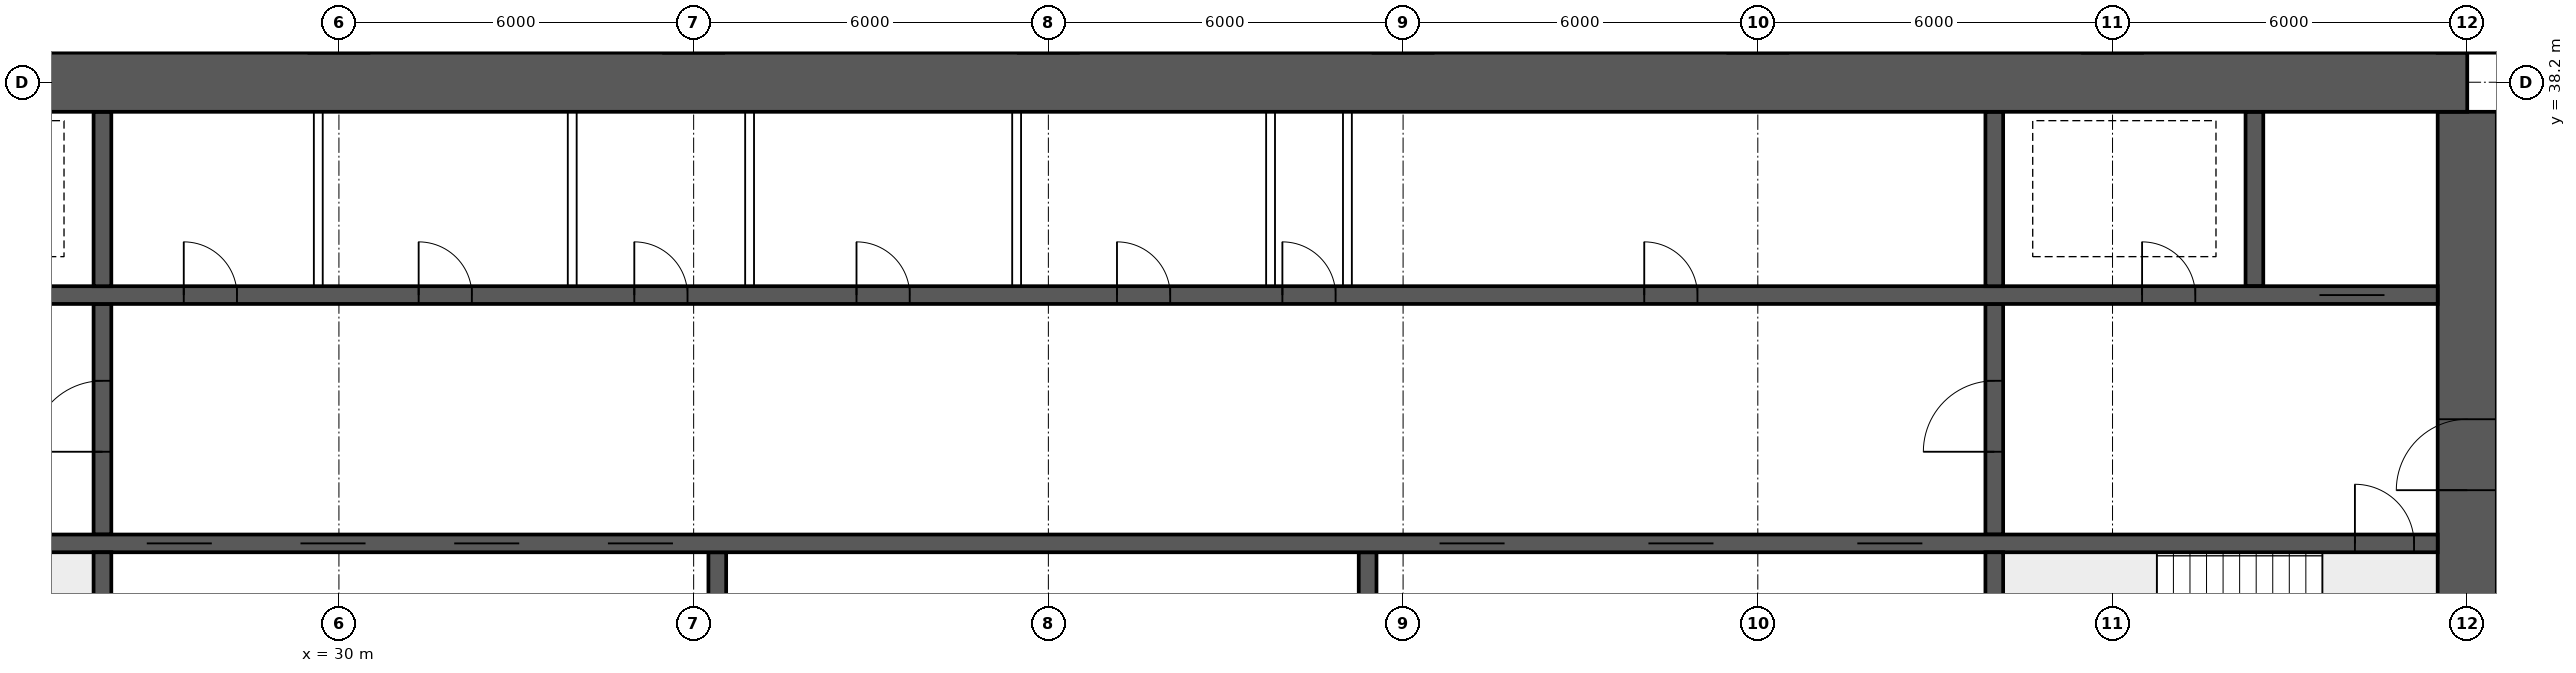
"""IFC4 building model, lengths in metres.
Left out: names, types, materials, properties, quantities, classifications, styles, units other than length and angle.
Written with IfcOpenShell. Run it as: python <this file> out.ifc"""

import sys

from ifc_helpers import new_model, si_unit, direction, frame, frame_2d, origin, place, context, subcontext, project, spatial, rectangle, extrude, element, fill, save


model = new_model("IFC4")
c1 = context("Model", 3, precision=1e-05, world=origin(), true_north=direction((0.0, 1.0)))
c2 = subcontext(c1, "Body", "Model", "MODEL_VIEW")
j1 = project(units=[si_unit("LENGTHUNIT", "METRE"), si_unit("PLANEANGLEUNIT", "RADIAN")], contexts=[c1])
p1 = place(None, origin())
s1 = spatial("IfcSite", under=j1, at=p1, CompositionType="ELEMENT")
p2 = place(p1, origin())
s2 = spatial("IfcBuilding", under=s1, at=p2, CompositionType="ELEMENT")
p3 = place(p2, frame((0.0, 0.0, 38.95)))
s3 = spatial("IfcBuildingStorey", under=s2, at=p3, CompositionType="ELEMENT", Elevation=38.95)
p4 = place(p3, frame((18.0, 38.2, 0.0), z_axis=(0.0, 0.0, 1.0), x_axis=(1.0, 0.0, 0.0)))
e1 = element("IfcWall", 1, at=p4, inside=s3, PredefinedType="SHEAR", context=c2, shape_type="SweptSolid", body=[
    extrude(rectangle(XDim=48.0, YDim=1.0, at=frame_2d((24.0, 0.0))), origin(), (0.0, 0.0, 1.0), 3.75),
])
p5 = place(p3, frame((66.0, 26.3, 0.0), z_axis=(0.0, 0.0, 1.0), x_axis=(0.0, 1.0, 0.0)))
e2 = element("IfcWall", 2, at=p5, inside=s3, PredefinedType="SHEAR", context=c2, shape_type="SweptSolid", body=[
    extrude(rectangle(XDim=11.4, YDim=1.0, at=frame_2d((5.7, 0.0))), origin(), (0.0, 0.0, 1.0), 3.75),
])
p6 = place(p5, frame((5.0, 0.0, 0.0)))
e3 = element("IfcOpeningElement", 3, at=p6, cuts=e2, PredefinedType="OPENING", context=c2, shape_type="SweptSolid", body=[
    extrude(rectangle(XDim=1.2, YDim=2.1, at=frame_2d((0.6, 1.05))), frame((0.0, 0.51, 0.0), z_axis=(0.0, -1.0, 0.0), x_axis=(1.0, 0.0, 0.0)), (0.0, 0.0, 1.0), 1.02),
])
p7 = place(p3, frame((18.5, 30.4, 0.0), z_axis=(0.0, 0.0, 1.0), x_axis=(1.0, 0.0, 0.0)))
e4 = element("IfcWall", 4, at=p7, inside=s3, PredefinedType="SHEAR", context=c2, shape_type="SweptSolid", body=[
    extrude(rectangle(XDim=47.0, YDim=0.3, at=frame_2d((23.5, 0.0))), origin(), (0.0, 0.0, 1.0), 3.75),
])
p8 = place(p7, frame((0.4, 0.0, 0.0)))
e5 = element("IfcOpeningElement", 5, at=p8, cuts=e4, PredefinedType="OPENING", context=c2, shape_type="SweptSolid", body=[
    extrude(rectangle(XDim=1.0, YDim=2.1, at=frame_2d((0.5, 1.05))), frame((0.0, 0.16, 0.0), z_axis=(0.0, -1.0, 0.0), x_axis=(1.0, 0.0, 0.0)), (0.0, 0.0, 1.0), 0.32),
])
p9 = place(p7, frame((45.6, 0.0, 0.0)))
e6 = element("IfcOpeningElement", 6, at=p9, cuts=e4, PredefinedType="OPENING", context=c2, shape_type="SweptSolid", body=[
    extrude(rectangle(XDim=1.0, YDim=2.1, at=frame_2d((0.5, 1.05))), frame((0.0, 0.16, 0.0), z_axis=(0.0, -1.0, 0.0), x_axis=(1.0, 0.0, 0.0)), (0.0, 0.0, 1.0), 0.32),
])
p10 = place(p7, frame((8.25, 0.0, 0.0)))
e7 = element("IfcOpeningElement", 7, at=p10, cuts=e4, PredefinedType="OPENING", context=c2, shape_type="SweptSolid", body=[
    extrude(rectangle(XDim=1.1, YDim=2.1, at=frame_2d((0.55, 1.05))), frame((0.0, 0.16, 0.0), z_axis=(0.0, -1.0, 0.0), x_axis=(1.0, 0.0, 0.0)), (0.0, 0.0, 1.0), 0.32),
])
p11 = place(p7, frame((10.85, 0.0, 0.0)))
e8 = element("IfcOpeningElement", 8, at=p11, cuts=e4, PredefinedType="OPENING", context=c2, shape_type="SweptSolid", body=[
    extrude(rectangle(XDim=1.1, YDim=2.1, at=frame_2d((0.55, 1.05))), frame((0.0, 0.16, 0.0), z_axis=(0.0, -1.0, 0.0), x_axis=(1.0, 0.0, 0.0)), (0.0, 0.0, 1.0), 0.32),
])
p12 = place(p7, frame((13.45, 0.0, 0.0)))
e9 = element("IfcOpeningElement", 9, at=p12, cuts=e4, PredefinedType="OPENING", context=c2, shape_type="SweptSolid", body=[
    extrude(rectangle(XDim=1.1, YDim=2.1, at=frame_2d((0.55, 1.05))), frame((0.0, 0.16, 0.0), z_axis=(0.0, -1.0, 0.0), x_axis=(1.0, 0.0, 0.0)), (0.0, 0.0, 1.0), 0.32),
])
p13 = place(p7, frame((16.05, 0.0, 0.0)))
e10 = element("IfcOpeningElement", 10, at=p13, cuts=e4, PredefinedType="OPENING", context=c2, shape_type="SweptSolid", body=[
    extrude(rectangle(XDim=1.1, YDim=2.1, at=frame_2d((0.55, 1.05))), frame((0.0, 0.16, 0.0), z_axis=(0.0, -1.0, 0.0), x_axis=(1.0, 0.0, 0.0)), (0.0, 0.0, 1.0), 0.32),
])
p14 = place(p7, frame((30.117, 0.0, 0.0)))
e11 = element("IfcOpeningElement", 11, at=p14, cuts=e4, PredefinedType="OPENING", context=c2, shape_type="SweptSolid", body=[
    extrude(rectangle(XDim=1.1, YDim=2.1, at=frame_2d((0.55, 1.05))), frame((0.0, 0.16, 0.0), z_axis=(0.0, -1.0, 0.0), x_axis=(1.0, 0.0, 0.0)), (0.0, 0.0, 1.0), 0.32),
])
p15 = place(p7, frame((33.65, 0.0, 0.0)))
e12 = element("IfcOpeningElement", 12, at=p15, cuts=e4, PredefinedType="OPENING", context=c2, shape_type="SweptSolid", body=[
    extrude(rectangle(XDim=1.1, YDim=2.1, at=frame_2d((0.55, 1.05))), frame((0.0, 0.16, 0.0), z_axis=(0.0, -1.0, 0.0), x_axis=(1.0, 0.0, 0.0)), (0.0, 0.0, 1.0), 0.32),
])
p16 = place(p7, frame((37.183, 0.0, 0.0)))
e13 = element("IfcOpeningElement", 13, at=p16, cuts=e4, PredefinedType="OPENING", context=c2, shape_type="SweptSolid", body=[
    extrude(rectangle(XDim=1.1, YDim=2.1, at=frame_2d((0.55, 1.05))), frame((0.0, 0.16, 0.0), z_axis=(0.0, -1.0, 0.0), x_axis=(1.0, 0.0, 0.0)), (0.0, 0.0, 1.0), 0.32),
])
p17 = place(p3, frame((18.5, 34.6, 0.0), z_axis=(0.0, 0.0, 1.0), x_axis=(1.0, 0.0, 0.0)))
e14 = element("IfcWall", 14, at=p17, inside=s3, PredefinedType="SHEAR", context=c2, shape_type="SweptSolid", body=[
    extrude(rectangle(XDim=47.0, YDim=0.3, at=frame_2d((23.5, 0.0))), origin(), (0.0, 0.0, 1.0), 3.75),
])
p18 = place(p17, frame((0.9, 0.0, 0.0)))
e15 = element("IfcOpeningElement", 15, at=p18, cuts=e14, PredefinedType="OPENING", context=c2, shape_type="SweptSolid", body=[
    extrude(rectangle(XDim=1.1, YDim=2.1, at=frame_2d((0.55, 1.05))), frame((0.0, 0.16, 0.0), z_axis=(0.0, -1.0, 0.0), x_axis=(1.0, 0.0, 0.0)), (0.0, 0.0, 1.0), 0.32),
])
p19 = place(p17, frame((45.0, 0.0, 0.0)))
e16 = element("IfcOpeningElement", 16, at=p19, cuts=e14, PredefinedType="OPENING", context=c2, shape_type="SweptSolid", body=[
    extrude(rectangle(XDim=1.1, YDim=2.1, at=frame_2d((0.55, 1.05))), frame((0.0, 0.16, 0.0), z_axis=(0.0, -1.0, 0.0), x_axis=(1.0, 0.0, 0.0)), (0.0, 0.0, 1.0), 0.32),
])
p20 = place(p17, frame((4.1, 0.0, 0.0)))
e17 = element("IfcOpeningElement", 17, at=p20, cuts=e14, PredefinedType="OPENING", context=c2, shape_type="SweptSolid", body=[
    extrude(rectangle(XDim=0.9, YDim=2.1, at=frame_2d((0.45, 1.05))), frame((0.0, 0.16, 0.0), z_axis=(0.0, -1.0, 0.0), x_axis=(1.0, 0.0, 0.0)), (0.0, 0.0, 1.0), 0.32),
])
p21 = place(p17, frame((42.0, 0.0, 0.0)))
e18 = element("IfcOpeningElement", 18, at=p21, cuts=e14, PredefinedType="OPENING", context=c2, shape_type="SweptSolid", body=[
    extrude(rectangle(XDim=0.9, YDim=2.1, at=frame_2d((0.45, 1.05))), frame((0.0, 0.16, 0.0), z_axis=(0.0, -1.0, 0.0), x_axis=(1.0, 0.0, 0.0)), (0.0, 0.0, 1.0), 0.32),
])
p22 = place(p17, frame((8.875, 0.0, 0.0)))
e19 = element("IfcOpeningElement", 19, at=p22, cuts=e14, PredefinedType="OPENING", context=c2, shape_type="SweptSolid", body=[
    extrude(rectangle(XDim=0.9, YDim=2.1, at=frame_2d((0.45, 1.05))), frame((0.0, 0.16, 0.0), z_axis=(0.0, -1.0, 0.0), x_axis=(1.0, 0.0, 0.0)), (0.0, 0.0, 1.0), 0.32),
])
p23 = place(p17, frame((12.849, 0.0, 0.0)))
e20 = element("IfcOpeningElement", 20, at=p23, cuts=e14, PredefinedType="OPENING", context=c2, shape_type="SweptSolid", body=[
    extrude(rectangle(XDim=0.9, YDim=2.1, at=frame_2d((0.45, 1.05))), frame((0.0, 0.16, 0.0), z_axis=(0.0, -1.0, 0.0), x_axis=(1.0, 0.0, 0.0)), (0.0, 0.0, 1.0), 0.32),
])
p24 = place(p17, frame((16.496, 0.0, 0.0)))
e21 = element("IfcOpeningElement", 21, at=p24, cuts=e14, PredefinedType="OPENING", context=c2, shape_type="SweptSolid", body=[
    extrude(rectangle(XDim=0.9, YDim=2.1, at=frame_2d((0.45, 1.05))), frame((0.0, 0.16, 0.0), z_axis=(0.0, -1.0, 0.0), x_axis=(1.0, 0.0, 0.0)), (0.0, 0.0, 1.0), 0.32),
])
p25 = place(p17, frame((20.255, 0.0, 0.0)))
e22 = element("IfcOpeningElement", 22, at=p25, cuts=e14, PredefinedType="OPENING", context=c2, shape_type="SweptSolid", body=[
    extrude(rectangle(XDim=0.9, YDim=2.1, at=frame_2d((0.45, 1.05))), frame((0.0, 0.16, 0.0), z_axis=(0.0, -1.0, 0.0), x_axis=(1.0, 0.0, 0.0)), (0.0, 0.0, 1.0), 0.32),
])
p26 = place(p17, frame((24.661, 0.0, 0.0)))
e23 = element("IfcOpeningElement", 23, at=p26, cuts=e14, PredefinedType="OPENING", context=c2, shape_type="SweptSolid", body=[
    extrude(rectangle(XDim=0.9, YDim=2.1, at=frame_2d((0.45, 1.05))), frame((0.0, 0.16, 0.0), z_axis=(0.0, -1.0, 0.0), x_axis=(1.0, 0.0, 0.0)), (0.0, 0.0, 1.0), 0.32),
])
p27 = place(p17, frame((27.458, 0.0, 0.0)))
e24 = element("IfcOpeningElement", 24, at=p27, cuts=e14, PredefinedType="OPENING", context=c2, shape_type="SweptSolid", body=[
    extrude(rectangle(XDim=0.9, YDim=2.1, at=frame_2d((0.45, 1.05))), frame((0.0, 0.16, 0.0), z_axis=(0.0, -1.0, 0.0), x_axis=(1.0, 0.0, 0.0)), (0.0, 0.0, 1.0), 0.32),
])
p28 = place(p17, frame((33.579, 0.0, 0.0)))
e25 = element("IfcOpeningElement", 25, at=p28, cuts=e14, PredefinedType="OPENING", context=c2, shape_type="SweptSolid", body=[
    extrude(rectangle(XDim=0.9, YDim=2.1, at=frame_2d((0.45, 1.05))), frame((0.0, 0.16, 0.0), z_axis=(0.0, -1.0, 0.0), x_axis=(1.0, 0.0, 0.0)), (0.0, 0.0, 1.0), 0.32),
])
for number, where, z_axis, x_axis in (
    (26, (26.0, 26.3, 0.0), (0.0, 0.0, 1.0), (0.0, 1.0, 0.0)),
    (27, (58.0, 26.3, 0.0), (0.0, 0.0, 1.0), (0.0, 1.0, 0.0)),
):
    element("IfcWall", number, at=place(p3, frame(where, z_axis=z_axis, x_axis=x_axis)), inside=s3, PredefinedType="SHEAR", context=c2, shape_type="SweptSolid", body=[
        extrude(rectangle(XDim=3.95, YDim=0.3, at=frame_2d((1.975, 0.0))), origin(), (0.0, 0.0, 1.0), 3.75),
    ])
p29 = place(p3, frame((26.0, 30.55, 0.0), z_axis=(0.0, 0.0, 1.0), x_axis=(0.0, 1.0, 0.0)))
e28 = element("IfcWall", 28, at=p29, inside=s3, PredefinedType="SHEAR", context=c2, shape_type="SweptSolid", body=[
    extrude(rectangle(XDim=3.9, YDim=0.3, at=frame_2d((1.95, 0.0))), origin(), (0.0, 0.0, 1.0), 3.75),
])
p30 = place(p29, frame((1.4, 0.0, 0.0)))
e29 = element("IfcOpeningElement", 29, at=p30, cuts=e28, PredefinedType="OPENING", context=c2, shape_type="SweptSolid", body=[
    extrude(rectangle(XDim=1.2, YDim=2.1, at=frame_2d((0.6, 1.05))), frame((0.0, 0.16, 0.0), z_axis=(0.0, -1.0, 0.0), x_axis=(1.0, 0.0, 0.0)), (0.0, 0.0, 1.0), 0.32),
])
p31 = place(p3, frame((58.0, 30.55, 0.0), z_axis=(0.0, 0.0, 1.0), x_axis=(0.0, 1.0, 0.0)))
e30 = element("IfcWall", 30, at=p31, inside=s3, PredefinedType="SHEAR", context=c2, shape_type="SweptSolid", body=[
    extrude(rectangle(XDim=3.9, YDim=0.3, at=frame_2d((1.95, 0.0))), origin(), (0.0, 0.0, 1.0), 3.75),
])
p32 = place(p31, frame((1.4, 0.0, 0.0)))
e31 = element("IfcOpeningElement", 31, at=p32, cuts=e30, PredefinedType="OPENING", context=c2, shape_type="SweptSolid", body=[
    extrude(rectangle(XDim=1.2, YDim=2.1, at=frame_2d((0.6, 1.05))), frame((0.0, 0.16, 0.0), z_axis=(0.0, -1.0, 0.0), x_axis=(1.0, 0.0, 0.0)), (0.0, 0.0, 1.0), 0.32),
])
for number, where, z_axis, x_axis in (
    (32, (62.4, 34.75, 0.0), (0.0, 0.0, 1.0), (0.0, 1.0, 0.0)),
    (33, (26.0, 34.75, 0.0), (0.0, 0.0, 1.0), (0.0, 1.0, 0.0)),
    (34, (58.0, 34.75, 0.0), (0.0, 0.0, 1.0), (0.0, 1.0, 0.0)),
):
    element("IfcWall", number, at=place(p3, frame(where, z_axis=z_axis, x_axis=x_axis)), inside=s3, PredefinedType="SHEAR", context=c2, shape_type="SweptSolid", body=[
        extrude(rectangle(XDim=2.95, YDim=0.3, at=frame_2d((1.475, 0.0))), origin(), (0.0, 0.0, 1.0), 3.75),
    ])
for number, where, z_axis, x_axis in (
    (35, (36.4, 26.3, 0.0), (0.0, 0.0, 1.0), (0.0, 1.0, 0.0)),
    (36, (47.4, 26.3, 0.0), (0.0, 0.0, 1.0), (0.0, 1.0, 0.0)),
):
    element("IfcWall", number, at=place(p3, frame(where, z_axis=z_axis, x_axis=x_axis)), inside=s3, PredefinedType="SHEAR", context=c2, shape_type="SweptSolid", body=[
        extrude(rectangle(XDim=3.95, YDim=0.3, at=frame_2d((1.975, 0.0))), origin(), (0.0, 0.0, 1.0), 3.75),
    ])
for number, where, z_axis, x_axis in (
    (37, (29.651, 34.75, 0.0), (0.0, 0.0, 1.0), (0.0, 1.0, 0.0)),
    (38, (33.946, 34.75, 0.0), (0.0, 0.0, 1.0), (0.0, 1.0, 0.0)),
    (39, (36.946, 34.75, 0.0), (0.0, 0.0, 1.0), (0.0, 1.0, 0.0)),
    (40, (41.463, 34.75, 0.0), (0.0, 0.0, 1.0), (0.0, 1.0, 0.0)),
    (41, (45.758, 34.75, 0.0), (0.0, 0.0, 1.0), (0.0, 1.0, 0.0)),
    (42, (47.058, 34.75, 0.0), (0.0, 0.0, 1.0), (0.0, 1.0, 0.0)),
):
    element("IfcWall", number, at=place(p3, frame(where, z_axis=z_axis, x_axis=x_axis)), inside=s3, PredefinedType="SOLIDWALL", context=c2, shape_type="SweptSolid", body=[
        extrude(rectangle(XDim=2.95, YDim=0.15, at=frame_2d((1.475, 0.0))), origin(), (0.0, 0.0, 1.0), 3.5),
    ])
p33 = place(p6, origin())
e43 = element("IfcDoor", 43, at=p33, inside=s3, OperationType="SINGLE_SWING_LEFT", PredefinedType="DOOR", context=c2, shape_type="SweptSolid", body=[
    extrude(rectangle(XDim=1.2, YDim=2.1, at=frame_2d((0.6, 1.05))), frame((0.0, 0.025, 0.0), z_axis=(0.0, -1.0, 0.0), x_axis=(1.0, 0.0, 0.0)), (0.0, 0.0, 1.0), 0.05),
])
fill(e3, e43)
p34 = place(p9, origin())
e44 = element("IfcDoor", 44, at=p34, inside=s3, OperationType="SINGLE_SWING_LEFT", PredefinedType="DOOR", context=c2, shape_type="SweptSolid", body=[
    extrude(rectangle(XDim=1.0, YDim=2.1, at=frame_2d((0.5, 1.05))), frame((0.0, 0.025, 0.0), z_axis=(0.0, -1.0, 0.0), x_axis=(1.0, 0.0, 0.0)), (0.0, 0.0, 1.0), 0.05),
])
fill(e6, e44)
p35 = place(p19, origin())
e45 = element("IfcDoor", 45, at=p35, inside=s3, OperationType="DOUBLE_DOOR_SLIDING", PredefinedType="DOOR", context=c2, shape_type="SweptSolid", body=[
    extrude(rectangle(XDim=1.1, YDim=2.1, at=frame_2d((0.55, 1.05))), frame((0.0, 0.025, 0.0), z_axis=(0.0, -1.0, 0.0), x_axis=(1.0, 0.0, 0.0)), (0.0, 0.0, 1.0), 0.05),
])
fill(e16, e45)
p36 = place(p21, origin())
e46 = element("IfcDoor", 46, at=p36, inside=s3, OperationType="SINGLE_SWING_LEFT", PredefinedType="DOOR", context=c2, shape_type="SweptSolid", body=[
    extrude(rectangle(XDim=0.9, YDim=2.1, at=frame_2d((0.45, 1.05))), frame((0.0, 0.025, 0.0), z_axis=(0.0, -1.0, 0.0), x_axis=(1.0, 0.0, 0.0)), (0.0, 0.0, 1.0), 0.05),
])
fill(e18, e46)
p37 = place(p30, origin())
e47 = element("IfcDoor", 47, at=p37, inside=s3, OperationType="SINGLE_SWING_LEFT", PredefinedType="DOOR", context=c2, shape_type="SweptSolid", body=[
    extrude(rectangle(XDim=1.2, YDim=2.1, at=frame_2d((0.6, 1.05))), frame((0.0, 0.025, 0.0), z_axis=(0.0, -1.0, 0.0), x_axis=(1.0, 0.0, 0.0)), (0.0, 0.0, 1.0), 0.05),
])
fill(e29, e47)
p38 = place(p32, origin())
e48 = element("IfcDoor", 48, at=p38, inside=s3, OperationType="SINGLE_SWING_LEFT", PredefinedType="DOOR", context=c2, shape_type="SweptSolid", body=[
    extrude(rectangle(XDim=1.2, YDim=2.1, at=frame_2d((0.6, 1.05))), frame((0.0, 0.025, 0.0), z_axis=(0.0, -1.0, 0.0), x_axis=(1.0, 0.0, 0.0)), (0.0, 0.0, 1.0), 0.05),
])
fill(e31, e48)
p39 = place(p22, origin())
e49 = element("IfcDoor", 49, at=p39, inside=s3, OperationType="SINGLE_SWING_LEFT", PredefinedType="DOOR", context=c2, shape_type="SweptSolid", body=[
    extrude(rectangle(XDim=0.9, YDim=2.1, at=frame_2d((0.45, 1.05))), frame((0.0, 0.025, 0.0), z_axis=(0.0, -1.0, 0.0), x_axis=(1.0, 0.0, 0.0)), (0.0, 0.0, 1.0), 0.05),
])
fill(e19, e49)
p40 = place(p23, origin())
e50 = element("IfcDoor", 50, at=p40, inside=s3, OperationType="SINGLE_SWING_LEFT", PredefinedType="DOOR", context=c2, shape_type="SweptSolid", body=[
    extrude(rectangle(XDim=0.9, YDim=2.1, at=frame_2d((0.45, 1.05))), frame((0.0, 0.025, 0.0), z_axis=(0.0, -1.0, 0.0), x_axis=(1.0, 0.0, 0.0)), (0.0, 0.0, 1.0), 0.05),
])
fill(e20, e50)
p41 = place(p24, origin())
e51 = element("IfcDoor", 51, at=p41, inside=s3, OperationType="SINGLE_SWING_LEFT", PredefinedType="DOOR", context=c2, shape_type="SweptSolid", body=[
    extrude(rectangle(XDim=0.9, YDim=2.1, at=frame_2d((0.45, 1.05))), frame((0.0, 0.025, 0.0), z_axis=(0.0, -1.0, 0.0), x_axis=(1.0, 0.0, 0.0)), (0.0, 0.0, 1.0), 0.05),
])
fill(e21, e51)
p42 = place(p25, origin())
e52 = element("IfcDoor", 52, at=p42, inside=s3, OperationType="SINGLE_SWING_LEFT", PredefinedType="DOOR", context=c2, shape_type="SweptSolid", body=[
    extrude(rectangle(XDim=0.9, YDim=2.1, at=frame_2d((0.45, 1.05))), frame((0.0, 0.025, 0.0), z_axis=(0.0, -1.0, 0.0), x_axis=(1.0, 0.0, 0.0)), (0.0, 0.0, 1.0), 0.05),
])
fill(e22, e52)
p43 = place(p26, origin())
e53 = element("IfcDoor", 53, at=p43, inside=s3, OperationType="SINGLE_SWING_LEFT", PredefinedType="DOOR", context=c2, shape_type="SweptSolid", body=[
    extrude(rectangle(XDim=0.9, YDim=2.1, at=frame_2d((0.45, 1.05))), frame((0.0, 0.025, 0.0), z_axis=(0.0, -1.0, 0.0), x_axis=(1.0, 0.0, 0.0)), (0.0, 0.0, 1.0), 0.05),
])
fill(e23, e53)
p44 = place(p27, origin())
e54 = element("IfcDoor", 54, at=p44, inside=s3, OperationType="SINGLE_SWING_LEFT", PredefinedType="DOOR", context=c2, shape_type="SweptSolid", body=[
    extrude(rectangle(XDim=0.9, YDim=2.1, at=frame_2d((0.45, 1.05))), frame((0.0, 0.025, 0.0), z_axis=(0.0, -1.0, 0.0), x_axis=(1.0, 0.0, 0.0)), (0.0, 0.0, 1.0), 0.05),
])
fill(e24, e54)
p45 = place(p28, origin())
e55 = element("IfcDoor", 55, at=p45, inside=s3, OperationType="SINGLE_SWING_LEFT", PredefinedType="DOOR", context=c2, shape_type="SweptSolid", body=[
    extrude(rectangle(XDim=0.9, YDim=2.1, at=frame_2d((0.45, 1.05))), frame((0.0, 0.025, 0.0), z_axis=(0.0, -1.0, 0.0), x_axis=(1.0, 0.0, 0.0)), (0.0, 0.0, 1.0), 0.05),
])
fill(e25, e55)
p46 = place(p10, origin())
e56 = element("IfcDoor", 56, at=p46, inside=s3, OperationType="DOUBLE_DOOR_SLIDING", PredefinedType="DOOR", context=c2, shape_type="SweptSolid", body=[
    extrude(rectangle(XDim=1.1, YDim=2.1, at=frame_2d((0.55, 1.05))), frame((0.0, 0.025, 0.0), z_axis=(0.0, -1.0, 0.0), x_axis=(1.0, 0.0, 0.0)), (0.0, 0.0, 1.0), 0.05),
])
fill(e7, e56)
p47 = place(p11, origin())
e57 = element("IfcDoor", 57, at=p47, inside=s3, OperationType="DOUBLE_DOOR_SLIDING", PredefinedType="DOOR", context=c2, shape_type="SweptSolid", body=[
    extrude(rectangle(XDim=1.1, YDim=2.1, at=frame_2d((0.55, 1.05))), frame((0.0, 0.025, 0.0), z_axis=(0.0, -1.0, 0.0), x_axis=(1.0, 0.0, 0.0)), (0.0, 0.0, 1.0), 0.05),
])
fill(e8, e57)
p48 = place(p12, origin())
e58 = element("IfcDoor", 58, at=p48, inside=s3, OperationType="DOUBLE_DOOR_SLIDING", PredefinedType="DOOR", context=c2, shape_type="SweptSolid", body=[
    extrude(rectangle(XDim=1.1, YDim=2.1, at=frame_2d((0.55, 1.05))), frame((0.0, 0.025, 0.0), z_axis=(0.0, -1.0, 0.0), x_axis=(1.0, 0.0, 0.0)), (0.0, 0.0, 1.0), 0.05),
])
fill(e9, e58)
p49 = place(p13, origin())
e59 = element("IfcDoor", 59, at=p49, inside=s3, OperationType="DOUBLE_DOOR_SLIDING", PredefinedType="DOOR", context=c2, shape_type="SweptSolid", body=[
    extrude(rectangle(XDim=1.1, YDim=2.1, at=frame_2d((0.55, 1.05))), frame((0.0, 0.025, 0.0), z_axis=(0.0, -1.0, 0.0), x_axis=(1.0, 0.0, 0.0)), (0.0, 0.0, 1.0), 0.05),
])
fill(e10, e59)
p50 = place(p14, origin())
e60 = element("IfcDoor", 60, at=p50, inside=s3, OperationType="DOUBLE_DOOR_SLIDING", PredefinedType="DOOR", context=c2, shape_type="SweptSolid", body=[
    extrude(rectangle(XDim=1.1, YDim=2.1, at=frame_2d((0.55, 1.05))), frame((0.0, 0.025, 0.0), z_axis=(0.0, -1.0, 0.0), x_axis=(1.0, 0.0, 0.0)), (0.0, 0.0, 1.0), 0.05),
])
fill(e11, e60)
p51 = place(p15, origin())
e61 = element("IfcDoor", 61, at=p51, inside=s3, OperationType="DOUBLE_DOOR_SLIDING", PredefinedType="DOOR", context=c2, shape_type="SweptSolid", body=[
    extrude(rectangle(XDim=1.1, YDim=2.1, at=frame_2d((0.55, 1.05))), frame((0.0, 0.025, 0.0), z_axis=(0.0, -1.0, 0.0), x_axis=(1.0, 0.0, 0.0)), (0.0, 0.0, 1.0), 0.05),
])
fill(e12, e61)
p52 = place(p16, origin())
e62 = element("IfcDoor", 62, at=p52, inside=s3, OperationType="DOUBLE_DOOR_SLIDING", PredefinedType="DOOR", context=c2, shape_type="SweptSolid", body=[
    extrude(rectangle(XDim=1.1, YDim=2.1, at=frame_2d((0.55, 1.05))), frame((0.0, 0.025, 0.0), z_axis=(0.0, -1.0, 0.0), x_axis=(1.0, 0.0, 0.0)), (0.0, 0.0, 1.0), 0.05),
])
fill(e13, e62)
save(model, sys.argv[1])
